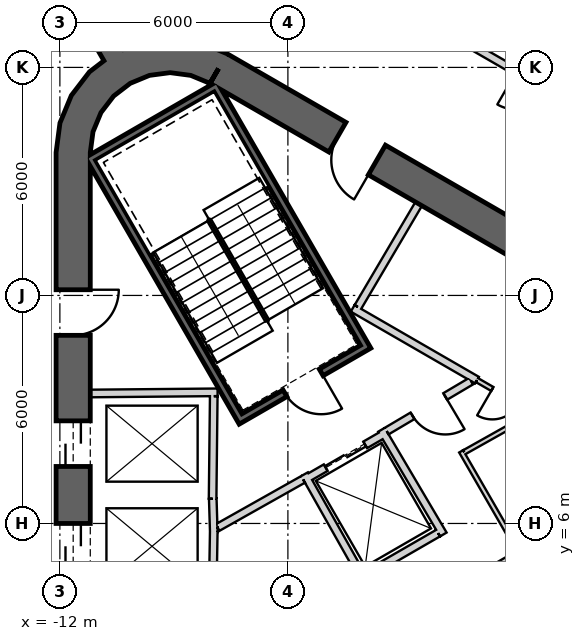
"""IFC4 building model, lengths in metres.
Left out: names, types, materials, properties, quantities, classifications, styles, units other than length and angle.
Written with IfcOpenShell. Run it as: python <this file> out.ifc"""

import sys

from ifc_helpers import new_model, si_unit, direction, frame, frame_2d, origin, place, context, subcontext, project, spatial, polyline, rectangle, outline, extrude, element, fill, save


model = new_model("IFC4")
c1 = context("Model", 3, precision=1e-05, world=origin(), true_north=direction((0.0, 1.0)))
c2 = subcontext(c1, "Body", "Model", "MODEL_VIEW")
j1 = project(units=[si_unit("LENGTHUNIT", "METRE"), si_unit("PLANEANGLEUNIT", "RADIAN")], contexts=[c1])
p1 = place(None, origin())
s1 = spatial("IfcSite", under=j1, at=p1, CompositionType="ELEMENT")
p2 = place(p1, origin())
s2 = spatial("IfcBuilding", under=s1, at=p2, CompositionType="ELEMENT")
p3 = place(p2, frame((0.0, 0.0, 310.4)))
s3 = spatial("IfcBuildingStorey", under=s2, at=p3, CompositionType="ELEMENT", Elevation=310.4)
p4 = place(p3, frame((19.475, 2.208, 0.0), z_axis=(0.0, 0.0, 1.0), x_axis=(-0.866028369851, 0.499994862586, 0.0)))
e1 = element("IfcWall", 1, at=p4, inside=s3, PredefinedType="SHEAR", context=c2, shape_type="SweptSolid", body=[
    extrude(rectangle(XDim=31.523, YDim=0.9, at=frame_2d((15.762, 0.0))), origin(), (0.0, 0.0, 1.0), 3.9),
])
p5 = place(p4, frame((7.062, 0.0, 0.0)))
e2 = element("IfcOpeningElement", 2, at=p5, cuts=e1, PredefinedType="OPENING", context=c2, shape_type="SweptSolid", body=[
    extrude(rectangle(XDim=1.2, YDim=2.4, at=frame_2d((0.6, 1.2))), frame((0.0, 0.46, 0.0), z_axis=(0.0, -1.0, 0.0), x_axis=(1.0, 0.0, 0.0)), (0.0, 0.0, 1.0), 0.92),
])
p6 = place(p4, frame((3.612, 0.0, 0.0)))
e3 = element("IfcOpeningElement", 3, at=p6, cuts=e1, PredefinedType="OPENING", context=c2, shape_type="SweptSolid", body=[
    extrude(rectangle(XDim=1.2, YDim=2.4, at=frame_2d((0.6, 1.2))), frame((0.0, 0.46, 0.0), z_axis=(0.0, -1.0, 0.0), x_axis=(1.0, 0.0, 0.0)), (0.0, 0.0, 1.0), 0.92),
])
p7 = place(p4, frame((26.712, 0.0, 0.0)))
e4 = element("IfcOpeningElement", 4, at=p7, cuts=e1, PredefinedType="OPENING", context=c2, shape_type="SweptSolid", body=[
    extrude(rectangle(XDim=1.2, YDim=2.4, at=frame_2d((0.6, 1.2))), frame((0.0, 0.46, 0.0), z_axis=(0.0, -1.0, 0.0), x_axis=(1.0, 0.0, 0.0)), (0.0, 0.0, 1.0), 0.92),
])
p8 = place(p3, frame((-11.65, 15.762, 0.0), z_axis=(0.0, 0.0, 1.0), x_axis=(0.0, -1.0, 0.0)))
e5 = element("IfcWall", 5, at=p8, inside=s3, PredefinedType="SHEAR", context=c2, shape_type="SweptSolid", body=[
    extrude(rectangle(XDim=31.523, YDim=0.9, at=frame_2d((15.762, 0.0))), origin(), (0.0, 0.0, 1.0), 3.9),
])
p9 = place(p8, frame((7.062, 0.0, 0.0)))
e6 = element("IfcOpeningElement", 6, at=p9, cuts=e5, PredefinedType="OPENING", context=c2, shape_type="SweptSolid", body=[
    extrude(rectangle(XDim=1.2, YDim=2.4, at=frame_2d((0.6, 1.2))), frame((0.0, 0.46, 0.0), z_axis=(0.0, -1.0, 0.0), x_axis=(1.0, 0.0, 0.0)), (0.0, 0.0, 1.0), 0.92),
])
p10 = place(p8, frame((9.762, 0.0, 0.0)))
e7 = element("IfcOpeningElement", 7, at=p10, cuts=e5, PredefinedType="OPENING", context=c2, shape_type="SweptSolid", body=[
    extrude(rectangle(XDim=1.2, YDim=2.4, at=frame_2d((0.6, 1.2))), frame((0.0, 0.46, 0.0), z_axis=(0.0, -1.0, 0.0), x_axis=(1.0, 0.0, 0.0)), (0.0, 0.0, 1.0), 0.92),
])
p11 = place(p8, frame((12.462, 0.0, 0.0)))
e8 = element("IfcOpeningElement", 8, at=p11, cuts=e5, PredefinedType="OPENING", context=c2, shape_type="SweptSolid", body=[
    extrude(rectangle(XDim=1.2, YDim=2.4, at=frame_2d((0.6, 1.2))), frame((0.0, 0.46, 0.0), z_axis=(0.0, -1.0, 0.0), x_axis=(1.0, 0.0, 0.0)), (0.0, 0.0, 1.0), 0.92),
])
p12 = place(p8, frame((15.162, 0.0, 0.0)))
e9 = element("IfcOpeningElement", 9, at=p12, cuts=e5, PredefinedType="OPENING", context=c2, shape_type="SweptSolid", body=[
    extrude(rectangle(XDim=1.2, YDim=2.4, at=frame_2d((0.6, 1.2))), frame((0.0, 0.46, 0.0), z_axis=(0.0, -1.0, 0.0), x_axis=(1.0, 0.0, 0.0)), (0.0, 0.0, 1.0), 0.92),
])
p13 = place(p8, frame((17.862, 0.0, 0.0)))
e10 = element("IfcOpeningElement", 10, at=p13, cuts=e5, PredefinedType="OPENING", context=c2, shape_type="SweptSolid", body=[
    extrude(rectangle(XDim=1.2, YDim=2.4, at=frame_2d((0.6, 1.2))), frame((0.0, 0.46, 0.0), z_axis=(0.0, -1.0, 0.0), x_axis=(1.0, 0.0, 0.0)), (0.0, 0.0, 1.0), 0.92),
])
p14 = place(p8, frame((20.562, 0.0, 0.0)))
e11 = element("IfcOpeningElement", 11, at=p14, cuts=e5, PredefinedType="OPENING", context=c2, shape_type="SweptSolid", body=[
    extrude(rectangle(XDim=1.2, YDim=2.4, at=frame_2d((0.6, 1.2))), frame((0.0, 0.46, 0.0), z_axis=(0.0, -1.0, 0.0), x_axis=(1.0, 0.0, 0.0)), (0.0, 0.0, 1.0), 0.92),
])
p15 = place(p8, frame((23.262, 0.0, 0.0)))
e12 = element("IfcOpeningElement", 12, at=p15, cuts=e5, PredefinedType="OPENING", context=c2, shape_type="SweptSolid", body=[
    extrude(rectangle(XDim=1.2, YDim=2.4, at=frame_2d((0.6, 1.2))), frame((0.0, 0.46, 0.0), z_axis=(0.0, -1.0, 0.0), x_axis=(1.0, 0.0, 0.0)), (0.0, 0.0, 1.0), 0.92),
])
p16 = place(p8, frame((3.612, 0.0, 0.0)))
e13 = element("IfcOpeningElement", 13, at=p16, cuts=e5, PredefinedType="OPENING", context=c2, shape_type="SweptSolid", body=[
    extrude(rectangle(XDim=1.2, YDim=2.4, at=frame_2d((0.6, 1.2))), frame((0.0, 0.46, 0.0), z_axis=(0.0, -1.0, 0.0), x_axis=(1.0, 0.0, 0.0)), (0.0, 0.0, 1.0), 0.92),
])
p17 = place(p8, frame((26.712, 0.0, 0.0)))
e14 = element("IfcOpeningElement", 14, at=p17, cuts=e5, PredefinedType="OPENING", context=c2, shape_type="SweptSolid", body=[
    extrude(rectangle(XDim=1.2, YDim=2.4, at=frame_2d((0.6, 1.2))), frame((0.0, 0.46, 0.0), z_axis=(0.0, -1.0, 0.0), x_axis=(1.0, 0.0, 0.0)), (0.0, 0.0, 1.0), 0.92),
])
p18 = place(p3, origin())
e15 = element("IfcWall", 15, at=p18, inside=s3, PredefinedType="SHEAR", context=c2, shape_type="SweptSolid", body=[
    extrude(outline(polyline([(-7.6, 18.36), (-8.323, 18.659), (-9.1, 18.762), (-9.876, 18.659), (-10.6, 18.36), (-11.221, 17.883), (-11.698, 17.262), (-11.998, 16.538), (-12.1, 15.762), (-11.2, 15.762), (-11.128, 16.305), (-10.919, 16.812), (-10.585, 17.247), (-10.15, 17.58), (-9.644, 17.79), (-9.1, 17.862), (-8.556, 17.79), (-8.05, 17.58), (-7.6, 18.36)])), origin(), (0.0, 0.0, 1.0), 3.9),
])
p19 = place(p3, frame((-10.575, 18.316, 0.0), z_axis=(0.0, 0.0, 1.0), x_axis=(-0.500009446655, 0.866019949687, 0.0)))
e16 = element("IfcWall", 16, at=p19, inside=s3, PredefinedType="SHEAR", context=c2, shape_type="SweptSolid", body=[
    extrude(rectangle(XDim=9.254, YDim=0.6, at=frame_2d((4.627, 0.0))), origin(), (0.0, 0.0, 1.0), 3.9),
])
p20 = place(p19, frame((1.4, 0.0, 0.0)))
e17 = element("IfcOpeningElement", 17, at=p20, cuts=e16, PredefinedType="OPENING", context=c2, shape_type="SweptSolid", body=[
    extrude(rectangle(XDim=1.4, YDim=2.4, at=frame_2d((0.7, 1.2))), frame((0.0, 0.31, 0.0), z_axis=(0.0, -1.0, 0.0), x_axis=(1.0, 0.0, 0.0)), (0.0, 0.0, 1.0), 0.62),
])
p21 = place(p3, frame((-11.2, 9.42, 0.0), z_axis=(0.0, 0.0, 1.0), x_axis=(0.999957167047, 0.009255488683, 0.0)))
e18 = element("IfcWall", 18, at=p21, inside=s3, PredefinedType="PLUMBINGWALL", context=c2, shape_type="SweptSolid", body=[
    extrude(rectangle(XDim=3.35, YDim=0.2, at=frame_2d((1.675, 0.0))), origin(), (0.0, 0.0, 1.0), 3.6),
])
p22 = place(p3, frame((-7.951, 9.35, 0.0), z_axis=(0.0, 0.0, 1.0), x_axis=(-0.011120469654, -0.999938165666, 0.0)))
e19 = element("IfcWall", 19, at=p22, inside=s3, PredefinedType="PLUMBINGWALL", context=c2, shape_type="SweptSolid", body=[
    extrude(rectangle(XDim=2.7, YDim=0.2, at=frame_2d((1.35, 0.0))), origin(), (0.0, 0.0, 1.0), 3.6),
])
p23 = place(p3, frame((-7.977, 6.65, 0.0), z_axis=(0.0, 0.0, 1.0), x_axis=(0.030861509705, -0.999523670164, 0.0)))
e20 = element("IfcWall", 20, at=p23, inside=s3, PredefinedType="PLUMBINGWALL", context=c2, shape_type="SweptSolid", body=[
    extrude(rectangle(XDim=0.878, YDim=0.2, at=frame_2d((0.439, 0.0))), origin(), (0.0, 0.0, 1.0), 3.6),
])
p24 = place(p3, frame((-7.949, 5.894, 0.0), z_axis=(0.0, 0.0, 1.0), x_axis=(-0.016809909365, -0.999858703491, 0.0)))
e21 = element("IfcWall", 21, at=p24, inside=s3, PredefinedType="PLUMBINGWALL", context=c2, shape_type="SweptSolid", body=[
    extrude(rectangle(XDim=1.844, YDim=0.2, at=frame_2d((0.922, 0.0))), origin(), (0.0, 0.0, 1.0), 3.6),
])
p25 = place(p3, frame((-11.245, 15.678, -0.3), z_axis=(0.0, 0.0, 1.0), x_axis=(0.499977274689, -0.866038523851, 0.0)))
e22 = element("IfcWall", 22, at=p25, inside=s3, PredefinedType="SHEAR", context=c2, shape_type="SweptSolid", body=[
    extrude(rectangle(XDim=8.1, YDim=0.2, at=frame_2d((4.05, 0.0))), origin(), (0.0, 0.0, 1.0), 3.9),
])
p26 = place(p3, frame((-7.818, 17.541, -0.3), z_axis=(0.0, 0.0, 1.0), x_axis=(-0.866044365799, -0.499967155389, 0.0)))
e23 = element("IfcWall", 23, at=p26, inside=s3, PredefinedType="SHEAR", context=c2, shape_type="SweptSolid", body=[
    extrude(rectangle(XDim=3.8, YDim=0.2, at=frame_2d((1.9, 0.0))), origin(), (0.0, 0.0, 1.0), 3.9),
])
p27 = place(p3, frame((-7.854, 17.405, -0.3), z_axis=(0.0, 0.0, 1.0), x_axis=(0.499997992926, -0.866026562566, 0.0)))
e24 = element("IfcWall", 24, at=p27, inside=s3, PredefinedType="SHEAR", context=c2, shape_type="SweptSolid", body=[
    extrude(rectangle(XDim=7.9, YDim=0.2, at=frame_2d((3.95, 0.0))), origin(), (0.0, 0.0, 1.0), 3.9),
])
p28 = place(p3, frame((-7.159, 8.8, -0.3), z_axis=(0.0, 0.0, 1.0), x_axis=(0.866047807691, 0.499961193289, 0.0)))
e25 = element("IfcWall", 25, at=p28, inside=s3, PredefinedType="SHEAR", context=c2, shape_type="SweptSolid", body=[
    extrude(rectangle(XDim=3.6, YDim=0.2, at=frame_2d((1.8, 0.0))), origin(), (0.0, 0.0, 1.0), 3.9),
])
p29 = place(p28, frame((1.25, 0.0, 0.3)))
e26 = element("IfcOpeningElement", 26, at=p29, cuts=e25, PredefinedType="OPENING", context=c2, shape_type="SweptSolid", body=[
    extrude(rectangle(XDim=1.1, YDim=2.1, at=frame_2d((0.55, 1.05))), frame((0.0, 0.11, 0.0), z_axis=(0.0, -1.0, 0.0), x_axis=(1.0, 0.0, 0.0)), (0.0, 0.0, 1.0), 0.22),
])
p30 = place(p3, frame((-5.524, 7.168, 0.0), z_axis=(0.0, 0.0, 1.0), x_axis=(0.866024647952, 0.500001309137, 0.0)))
e27 = element("IfcWall", 27, at=p30, inside=s3, PredefinedType="PLUMBINGWALL", context=c2, shape_type="SweptSolid", body=[
    extrude(rectangle(XDim=2.4, YDim=0.2, at=frame_2d((1.2, 0.0))), origin(), (0.0, 0.0, 1.0), 3.6),
])
p31 = place(p30, frame((0.6, 0.0, 0.0)))
e28 = element("IfcOpeningElement", 28, at=p31, cuts=e27, PredefinedType="OPENING", context=c2, shape_type="SweptSolid", body=[
    extrude(rectangle(XDim=1.2, YDim=2.4, at=frame_2d((0.6, 1.2))), frame((0.0, 0.11, 0.0), z_axis=(0.0, -1.0, 0.0), x_axis=(1.0, 0.0, 0.0)), (0.0, 0.0, 1.0), 0.22),
])
p32 = place(p3, frame((-4.039, 4.596, 0.0), z_axis=(0.0, 0.0, 1.0), x_axis=(-0.491322718731, 0.870977603649, 0.0)))
e29 = element("IfcWall", 29, at=p32, inside=s3, PredefinedType="PLUMBINGWALL", context=c2, shape_type="SweptSolid", body=[
    extrude(rectangle(XDim=3.1, YDim=0.2, at=frame_2d((1.55, 0.0))), origin(), (0.0, 0.0, 1.0), 3.6),
])
p33 = place(p3, frame((-3.538, 8.465, 0.0), z_axis=(0.0, 0.0, 1.0), x_axis=(0.508616218331, -0.860993346345, 0.0)))
e30 = element("IfcWall", 30, at=p33, inside=s3, PredefinedType="PLUMBINGWALL", context=c2, shape_type="SweptSolid", body=[
    extrude(rectangle(XDim=3.2, YDim=0.2, at=frame_2d((1.6, 0.0))), origin(), (0.0, 0.0, 1.0), 3.6),
])
p34 = place(p3, frame((-2.047, 5.746, 0.0), z_axis=(0.0, 0.0, 1.0), x_axis=(-0.866019606374, -0.500010041276, 0.0)))
e31 = element("IfcWall", 31, at=p34, inside=s3, PredefinedType="PLUMBINGWALL", context=c2, shape_type="SweptSolid", body=[
    extrude(rectangle(XDim=2.205, YDim=0.2, at=frame_2d((1.102, 0.0))), origin(), (0.0, 0.0, 1.0), 3.6),
])
p35 = place(p3, frame((-1.024, 9.771, 0.0), z_axis=(0.0, 0.0, 1.0), x_axis=(0.866039397417, -0.499975761534, 0.0)))
e32 = element("IfcWall", 32, at=p35, inside=s3, PredefinedType="PARTITIONING", context=c2, shape_type="SweptSolid", body=[
    extrude(rectangle(XDim=1.752, YDim=0.12, at=frame_2d((0.876, 0.0))), origin(), (0.0, 0.0, 1.0), 3.6),
])
p36 = place(p35, frame((0.466, 0.0, 0.0)))
e33 = element("IfcOpeningElement", 33, at=p36, cuts=e32, PredefinedType="OPENING", context=c2, shape_type="SweptSolid", body=[
    extrude(rectangle(XDim=0.8, YDim=2.1, at=frame_2d((0.4, 1.05))), frame((0.0, 0.07, 0.0), z_axis=(0.0, -1.0, 0.0), x_axis=(1.0, 0.0, 0.0)), (0.0, 0.0, 1.0), 0.14),
])
p37 = place(p3, frame((-4.296, 11.66, 0.0), z_axis=(0.0, 0.0, 1.0), x_axis=(0.866027389382, -0.499996560828, 0.0)))
e34 = element("IfcWall", 34, at=p37, inside=s3, PredefinedType="PARTITIONING", context=c2, shape_type="SweptSolid", body=[
    extrude(rectangle(XDim=3.778, YDim=0.2, at=frame_2d((1.889, 0.0))), origin(), (0.0, 0.0, 1.0), 3.6),
])
p38 = place(p3, frame((-2.558, 14.409, 0.0), z_axis=(0.0, 0.0, 1.0), x_axis=(-0.508018930956, -0.861345903683, 0.0)))
e35 = element("IfcWall", 35, at=p38, inside=s3, PredefinedType="PARTITIONING", context=c2, shape_type="SweptSolid", body=[
    extrude(rectangle(XDim=3.15, YDim=0.2, at=frame_2d((1.575, 0.0))), origin(), (0.0, 0.0, 1.0), 3.6),
])
p39 = place(p3, frame((-5.6, 7.16, 0.0), z_axis=(0.0, 0.0, 1.0), x_axis=(-0.871340486379, -0.490678873396, 0.0)))
e36 = element("IfcWall", 36, at=p39, inside=s3, PredefinedType="PARTITIONING", context=c2, shape_type="SweptSolid", body=[
    extrude(rectangle(XDim=2.581, YDim=0.2, at=frame_2d((1.291, 0.0))), origin(), (0.0, 0.0, 1.0), 3.6),
])
p40 = place(p3, frame((-1.179, 9.745, 0.0), z_axis=(0.0, 0.0, 1.0), x_axis=(-0.860630814782, -0.509229418482, 0.0)))
e37 = element("IfcWall", 37, at=p40, inside=s3, PredefinedType="PARTITIONING", context=c2, shape_type="SweptSolid", body=[
    extrude(rectangle(XDim=2.582, YDim=0.2, at=frame_2d((1.291, 0.0))), origin(), (0.0, 0.0, 1.0), 3.6),
])
p41 = place(p40, frame((0.791, 0.0, 0.0)))
e38 = element("IfcOpeningElement", 38, at=p41, cuts=e37, PredefinedType="OPENING", context=c2, shape_type="SweptSolid", body=[
    extrude(rectangle(XDim=1.0, YDim=2.1, at=frame_2d((0.5, 1.05))), frame((0.0, 0.11, 0.0), z_axis=(0.0, -1.0, 0.0), x_axis=(1.0, 0.0, 0.0)), (0.0, 0.0, 1.0), 0.22),
])
p42 = place(p3, frame((0.14, 5.277, 0.0), z_axis=(0.0, 0.0, 1.0), x_axis=(-0.865989465428, -0.500062241894, 0.0)))
e39 = element("IfcWall", 39, at=p42, inside=s3, PredefinedType="PARTITIONING", context=c2, shape_type="SweptSolid", body=[
    extrude(rectangle(XDim=1.7, YDim=0.12, at=frame_2d((0.85, 0.0))), origin(), (0.0, 0.0, 1.0), 3.6),
])
p43 = place(p3, frame((-1.442, 7.897, 0.0), z_axis=(0.0, 0.0, 1.0), x_axis=(0.499990139034, -0.866031096941, 0.0)))
e40 = element("IfcWall", 40, at=p43, inside=s3, PredefinedType="PARTITIONING", context=c2, shape_type="SweptSolid", body=[
    extrude(rectangle(XDim=3.0, YDim=0.12, at=frame_2d((1.5, 0.0))), origin(), (0.0, 0.0, 1.0), 3.6),
])
p44 = place(p3, frame((0.414, 8.871, 0.0), z_axis=(0.0, 0.0, 1.0), x_axis=(-0.871809386997, -0.48984527429, 0.0)))
e41 = element("IfcWall", 41, at=p44, inside=s3, PredefinedType="PARTITIONING", context=c2, shape_type="SweptSolid", body=[
    extrude(rectangle(XDim=2.034, YDim=0.12, at=frame_2d((1.017, 0.0))), origin(), (0.0, 0.0, 1.0), 3.6),
])
p45 = place(p3, frame((7.289, 13.689, 0.0), z_axis=(0.0, 0.0, 1.0), x_axis=(-0.866022017938, 0.500005864412, 0.0)))
e42 = element("IfcWall", 42, at=p45, inside=s3, PredefinedType="PARTITIONING", context=c2, shape_type="SweptSolid", body=[
    extrude(rectangle(XDim=15.808, YDim=0.2, at=frame_2d((7.904, 0.0))), origin(), (0.0, 0.0, 1.0), 2.88),
])
p46 = place(p45, frame((7.404, 0.0, 0.0)))
e43 = element("IfcOpeningElement", 43, at=p46, cuts=e42, PredefinedType="OPENING", context=c2, shape_type="SweptSolid", body=[
    extrude(rectangle(XDim=1.0, YDim=2.1, at=frame_2d((0.5, 1.05))), frame((0.0, 0.11, 0.0), z_axis=(0.0, -1.0, 0.0), x_axis=(1.0, 0.0, 0.0)), (0.0, 0.0, 1.0), 0.22),
])
p47 = place(p29, origin())
e44 = element("IfcDoor", 44, at=p47, inside=s3, OperationType="SINGLE_SWING_LEFT", PredefinedType="USERDEFINED", context=c2, shape_type="SweptSolid", body=[
    extrude(rectangle(XDim=1.1, YDim=2.1, at=frame_2d((0.55, 1.05))), frame((0.0, 0.025, 0.0), z_axis=(0.0, -1.0, 0.0), x_axis=(1.0, 0.0, 0.0)), (0.0, 0.0, 1.0), 0.05),
])
fill(e26, e44)
p48 = place(p41, origin())
e45 = element("IfcDoor", 45, at=p48, inside=s3, OperationType="SINGLE_SWING_LEFT", PredefinedType="USERDEFINED", context=c2, shape_type="SweptSolid", body=[
    extrude(rectangle(XDim=1.0, YDim=2.1, at=frame_2d((0.5, 1.05))), frame((0.0, 0.025, 0.0), z_axis=(0.0, -1.0, 0.0), x_axis=(1.0, 0.0, 0.0)), (0.0, 0.0, 1.0), 0.05),
])
fill(e38, e45)
p49 = place(p31, origin())
e46 = element("IfcDoor", 46, at=p49, inside=s3, OperationType="SLIDING_TO_LEFT", PredefinedType="USERDEFINED", context=c2, shape_type="SweptSolid", body=[
    extrude(rectangle(XDim=1.2, YDim=2.4, at=frame_2d((0.6, 1.2))), frame((0.0, 0.025, 0.0), z_axis=(0.0, -1.0, 0.0), x_axis=(1.0, 0.0, 0.0)), (0.0, 0.0, 1.0), 0.05),
])
fill(e28, e46)
p50 = place(p36, origin())
e47 = element("IfcDoor", 47, at=p50, inside=s3, OperationType="SINGLE_SWING_RIGHT", PredefinedType="USERDEFINED", context=c2, shape_type="SweptSolid", body=[
    extrude(rectangle(XDim=0.8, YDim=2.1, at=frame_2d((0.4, 1.05))), frame((0.0, 0.025, 0.0), z_axis=(0.0, -1.0, 0.0), x_axis=(1.0, 0.0, 0.0)), (0.0, 0.0, 1.0), 0.05),
])
fill(e33, e47)
p51 = place(p9, origin())
e48 = element("IfcDoor", 48, at=p51, inside=s3, OperationType="SLIDING_TO_LEFT", PredefinedType="USERDEFINED", context=c2, shape_type="SweptSolid", body=[
    extrude(rectangle(XDim=1.2, YDim=2.4, at=frame_2d((0.6, 1.2))), frame((0.0, 0.025, 0.0), z_axis=(0.0, -1.0, 0.0), x_axis=(1.0, 0.0, 0.0)), (0.0, 0.0, 1.0), 0.05),
])
fill(e6, e48)
p52 = place(p10, origin())
e49 = element("IfcDoor", 49, at=p52, inside=s3, OperationType="SLIDING_TO_LEFT", PredefinedType="USERDEFINED", context=c2, shape_type="SweptSolid", body=[
    extrude(rectangle(XDim=1.2, YDim=2.4, at=frame_2d((0.6, 1.2))), frame((0.0, 0.025, 0.0), z_axis=(0.0, -1.0, 0.0), x_axis=(1.0, 0.0, 0.0)), (0.0, 0.0, 1.0), 0.05),
])
fill(e7, e49)
p53 = place(p7, origin())
e50 = element("IfcDoor", 50, at=p53, inside=s3, OperationType="SINGLE_SWING_LEFT", PredefinedType="USERDEFINED", context=c2, shape_type="SweptSolid", body=[
    extrude(rectangle(XDim=1.2, YDim=2.4, at=frame_2d((0.6, 1.2))), frame((0.0, 0.025, 0.0), z_axis=(0.0, -1.0, 0.0), x_axis=(1.0, 0.0, 0.0)), (0.0, 0.0, 1.0), 0.05),
])
fill(e4, e50)
p54 = place(p16, origin())
e51 = element("IfcDoor", 51, at=p54, inside=s3, OperationType="SINGLE_SWING_LEFT", PredefinedType="USERDEFINED", context=c2, shape_type="SweptSolid", body=[
    extrude(rectangle(XDim=1.2, YDim=2.4, at=frame_2d((0.6, 1.2))), frame((0.0, 0.025, 0.0), z_axis=(0.0, -1.0, 0.0), x_axis=(1.0, 0.0, 0.0)), (0.0, 0.0, 1.0), 0.05),
])
fill(e13, e51)
save(model, sys.argv[1])
